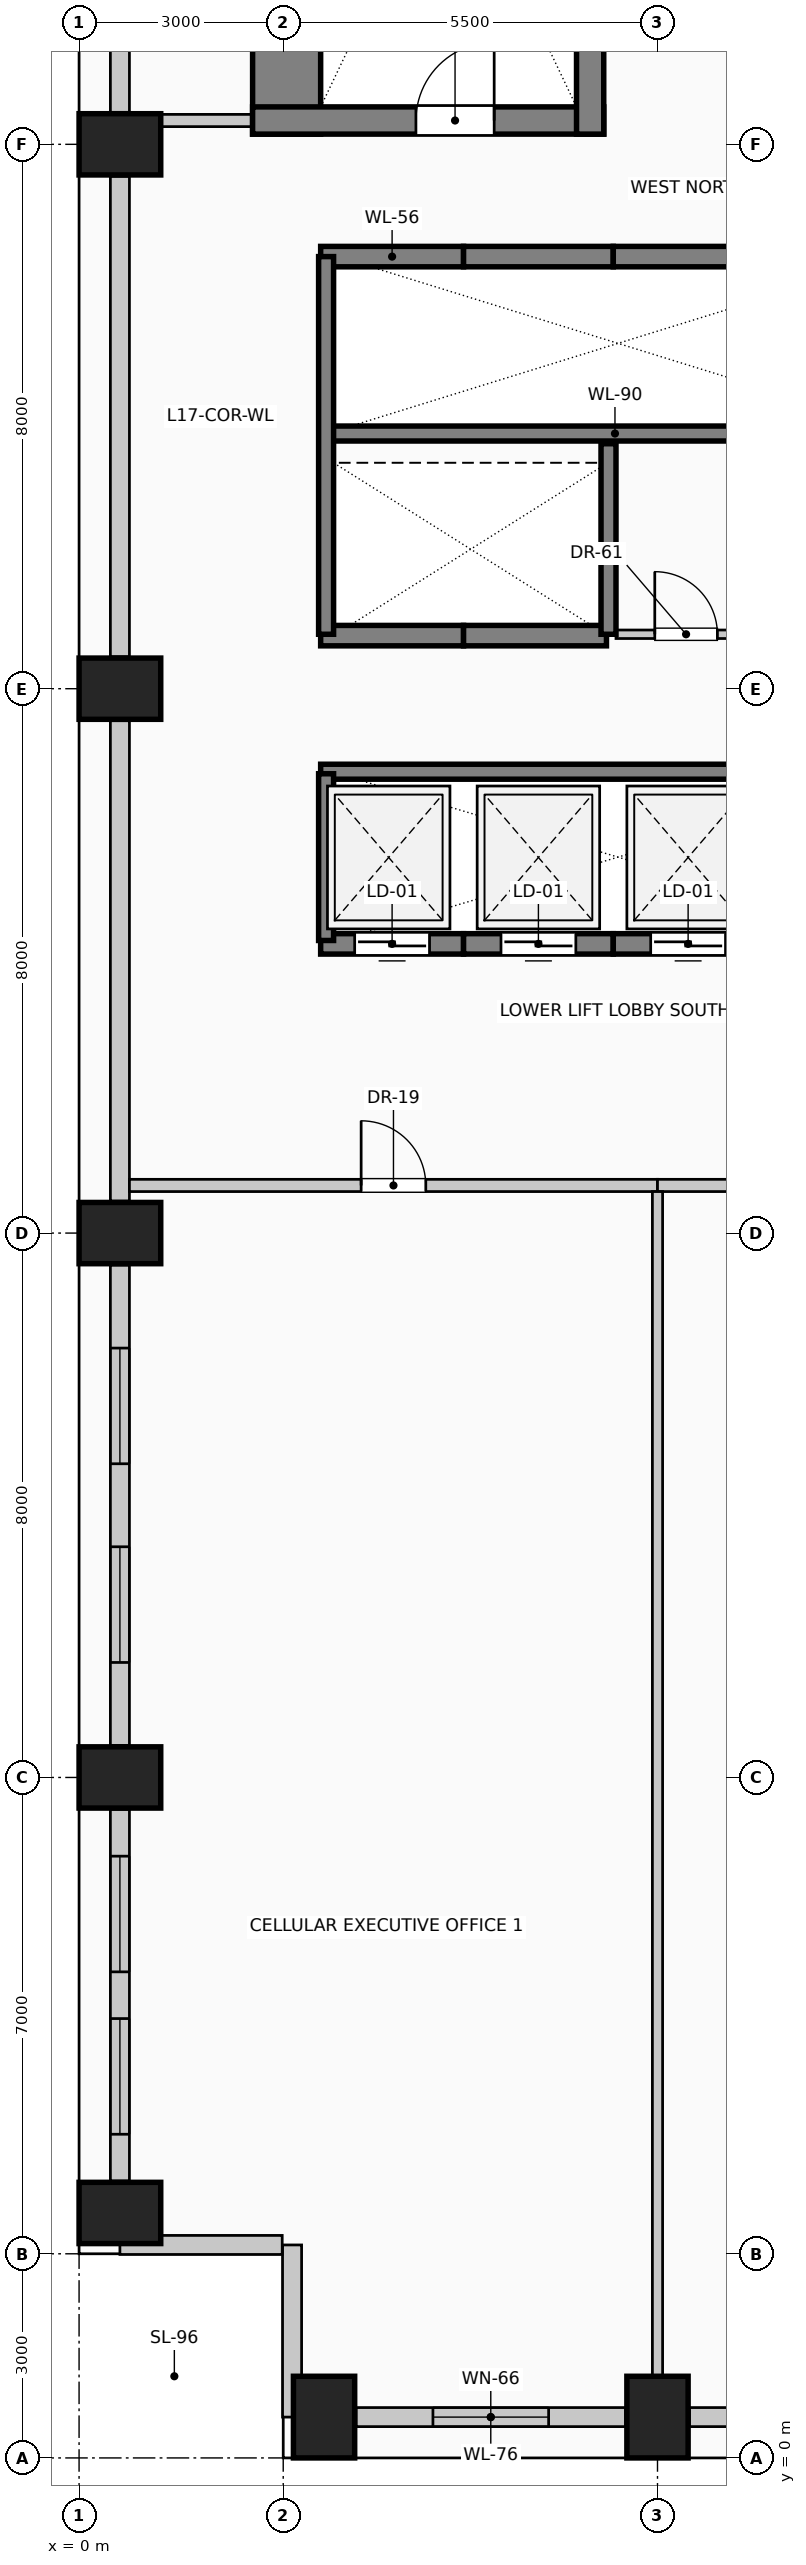
"""IFC4 building model, lengths in metres.
Left out: names, types, materials, properties, quantities, classifications, styles, units other than length and angle.
Written with IfcOpenShell. Run it as: python <this file> out.ifc"""

import sys

from ifc_helpers import new_model, si_unit, direction, frame, frame_2d, origin, origin_2d, place, context, subcontext, project, spatial, rectangle, extrude, element, fill, save


model = new_model("IFC4")
c1 = context("Model", 3, precision=1e-05, world=origin(), true_north=direction((0.0, 1.0)))
c2 = subcontext(c1, "Body", "Model", "MODEL_VIEW")
j1 = project(units=[si_unit("LENGTHUNIT", "METRE"), si_unit("PLANEANGLEUNIT", "RADIAN")], contexts=[c1])
p1 = place(None, origin())
s1 = spatial("IfcSite", under=j1, at=p1, CompositionType="ELEMENT")
p2 = place(p1, origin())
s2 = spatial("IfcBuilding", under=s1, at=p2, CompositionType="ELEMENT")
p3 = place(p2, frame((0.0, 0.0, 70.6)))
s3 = spatial("IfcBuildingStorey", under=s2, at=p3, CompositionType="ELEMENT", Elevation=70.6)
p4 = place(p3, frame((3.05, 34.15, 0.0), z_axis=(0.0, 0.0, 1.0), x_axis=(0.0, 1.0, 0.0)))
e1 = element("IfcWall", 1, at=p4, inside=s3, PredefinedType="SHEAR", context=c2, shape_type="SweptSolid", body=[
    extrude(rectangle(XDim=9.28, YDim=1.0, at=frame_2d((4.64, 0.0))), origin(), (0.0, 0.0, 1.0), 4.0),
])
p5 = place(p3, frame((2.55, 34.35, 0.0), z_axis=(0.0, 0.0, 1.0), x_axis=(1.0, 0.0, 0.0)))
e2 = element("IfcWall", 2, at=p5, inside=s3, PredefinedType="SHEAR", context=c2, shape_type="SweptSolid", body=[
    extrude(rectangle(XDim=5.16, YDim=0.4, at=frame_2d((2.58, 0.0))), origin(), (0.0, 0.0, 1.0), 4.0),
])
p6 = place(p5, frame((2.4, 0.0, 0.0)))
e3 = element("IfcOpeningElement", 3, at=p6, cuts=e2, PredefinedType="OPENING", context=c2, shape_type="SweptSolid", body=[
    extrude(rectangle(XDim=1.15, YDim=2.2, at=frame_2d((0.575, 1.1))), frame((0.0, 0.21, 0.0), z_axis=(0.0, -1.0, 0.0), x_axis=(1.0, 0.0, 0.0)), (0.0, 0.0, 1.0), 0.42),
])
p7 = place(p3, frame((7.51, 34.15, 0.0), z_axis=(0.0, 0.0, 1.0), x_axis=(0.0, 1.0, 0.0)))
e4 = element("IfcWall", 4, at=p7, inside=s3, PredefinedType="SHEAR", context=c2, shape_type="SweptSolid", body=[
    extrude(rectangle(XDim=9.28, YDim=0.4, at=frame_2d((4.64, 0.0))), origin(), (0.0, 0.0, 1.0), 4.0),
])
for number, where, z_axis, x_axis in (
    (5, (3.6, 0.6, 0.0), (0.0, 0.0, 1.0), (1.0, 0.0, 0.0)),
    (6, (8.5, 0.6, 0.0), (0.0, 0.0, 1.0), (1.0, 0.0, 0.0)),
    (7, (0.6, 3.6, 0.0), (0.0, 0.0, 1.0), (0.0, 1.0, 0.0)),
    (8, (0.6, 10.0, 0.0), (0.0, 0.0, 1.0), (0.0, 1.0, 0.0)),
    (9, (0.6, 18.0, 0.0), (0.0, 0.0, 1.0), (0.0, 1.0, 0.0)),
    (10, (0.6, 26.0, 0.0), (0.0, 0.0, 1.0), (0.0, 1.0, 0.0)),
    (11, (0.6, 34.0, 0.0), (0.0, 0.0, 1.0), (0.0, 1.0, 0.0)),
):
    element("IfcColumn", number, at=place(p3, frame(where, z_axis=z_axis, x_axis=x_axis)), inside=s3, PredefinedType="COLUMN", context=c2, shape_type="SweptSolid", body=[
        extrude(rectangle(XDim=0.9, YDim=1.2, at=origin_2d()), origin(), (0.0, 0.0, 1.0), 4.0),
    ])
p8 = place(p3, frame((8.03, 0.6, 0.0), z_axis=(0.0, 0.0, 1.0), x_axis=(-1.0, 0.0, 0.0)))
e12 = element("IfcWall", 12, at=p8, inside=s3, PredefinedType="SOLIDWALL", context=c2, shape_type="SweptSolid", body=[
    extrude(rectangle(XDim=3.96, YDim=0.28, at=frame_2d((1.98, 0.0))), origin(), (0.0, 0.0, 1.0), 2.85),
])
p9 = place(p8, frame((1.13, 0.0, 0.5)))
e13 = element("IfcOpeningElement", 13, at=p9, cuts=e12, PredefinedType="OPENING", context=c2, shape_type="SweptSolid", body=[
    extrude(rectangle(XDim=1.7, YDim=1.95, at=frame_2d((0.85, 0.975))), frame((0.0, 0.15, 0.0), z_axis=(0.0, -1.0, 0.0), x_axis=(1.0, 0.0, 0.0)), (0.0, 0.0, 1.0), 0.3),
])
p10 = place(p3, frame((13.53, 0.6, 0.0), z_axis=(0.0, 0.0, 1.0), x_axis=(-1.0, 0.0, 0.0)))
e14 = element("IfcWall", 14, at=p10, inside=s3, PredefinedType="SOLIDWALL", context=c2, shape_type="SweptSolid", body=[
    extrude(rectangle(XDim=4.56, YDim=0.28, at=frame_2d((2.28, 0.0))), origin(), (0.0, 0.0, 1.0), 2.85),
])
p11 = place(p3, frame((0.6, 4.07, 0.0), z_axis=(0.0, 0.0, 1.0), x_axis=(0.0, 1.0, 0.0)))
e15 = element("IfcWall", 15, at=p11, inside=s3, PredefinedType="SOLIDWALL", context=c2, shape_type="SweptSolid", body=[
    extrude(rectangle(XDim=5.46, YDim=0.28, at=frame_2d((2.73, 0.0))), origin(), (0.0, 0.0, 1.0), 2.85),
])
p12 = place(p11, frame((0.687, 0.0, 0.5)))
e16 = element("IfcOpeningElement", 16, at=p12, cuts=e15, PredefinedType="OPENING", context=c2, shape_type="SweptSolid", body=[
    extrude(rectangle(XDim=1.7, YDim=1.95, at=frame_2d((0.85, 0.975))), frame((0.0, 0.15, 0.0), z_axis=(0.0, -1.0, 0.0), x_axis=(1.0, 0.0, 0.0)), (0.0, 0.0, 1.0), 0.3),
])
p13 = place(p11, frame((3.073, 0.0, 0.5)))
e17 = element("IfcOpeningElement", 17, at=p13, cuts=e15, PredefinedType="OPENING", context=c2, shape_type="SweptSolid", body=[
    extrude(rectangle(XDim=1.7, YDim=1.95, at=frame_2d((0.85, 0.975))), frame((0.0, 0.15, 0.0), z_axis=(0.0, -1.0, 0.0), x_axis=(1.0, 0.0, 0.0)), (0.0, 0.0, 1.0), 0.3),
])
p14 = place(p3, frame((0.6, 10.47, 0.0), z_axis=(0.0, 0.0, 1.0), x_axis=(0.0, 1.0, 0.0)))
e18 = element("IfcWall", 18, at=p14, inside=s3, PredefinedType="SOLIDWALL", context=c2, shape_type="SweptSolid", body=[
    extrude(rectangle(XDim=7.06, YDim=0.28, at=frame_2d((3.53, 0.0))), origin(), (0.0, 0.0, 1.0), 2.85),
])
p15 = place(p14, frame((1.22, 0.0, 0.5)))
e19 = element("IfcOpeningElement", 19, at=p15, cuts=e18, PredefinedType="OPENING", context=c2, shape_type="SweptSolid", body=[
    extrude(rectangle(XDim=1.7, YDim=1.95, at=frame_2d((0.85, 0.975))), frame((0.0, 0.15, 0.0), z_axis=(0.0, -1.0, 0.0), x_axis=(1.0, 0.0, 0.0)), (0.0, 0.0, 1.0), 0.3),
])
p16 = place(p14, frame((4.14, 0.0, 0.5)))
e20 = element("IfcOpeningElement", 20, at=p16, cuts=e18, PredefinedType="OPENING", context=c2, shape_type="SweptSolid", body=[
    extrude(rectangle(XDim=1.7, YDim=1.95, at=frame_2d((0.85, 0.975))), frame((0.0, 0.15, 0.0), z_axis=(0.0, -1.0, 0.0), x_axis=(1.0, 0.0, 0.0)), (0.0, 0.0, 1.0), 0.3),
])
for number, where, z_axis, x_axis in (
    (21, (0.6, 18.47, 0.0), (0.0, 0.0, 1.0), (0.0, 1.0, 0.0)),
    (22, (0.6, 26.47, 0.0), (0.0, 0.0, 1.0), (0.0, 1.0, 0.0)),
):
    element("IfcWall", number, at=place(p3, frame(where, z_axis=z_axis, x_axis=x_axis)), inside=s3, PredefinedType="SOLIDWALL", context=c2, shape_type="SweptSolid", body=[
        extrude(rectangle(XDim=7.06, YDim=0.28, at=frame_2d((3.53, 0.0))), origin(), (0.0, 0.0, 1.0), 2.85),
    ])
p17 = place(p3, frame((0.6, 34.47, 0.0), z_axis=(0.0, 0.0, 1.0), x_axis=(0.0, 1.0, 0.0)))
e23 = element("IfcWall", 23, at=p17, inside=s3, PredefinedType="SOLIDWALL", context=c2, shape_type="SweptSolid", body=[
    extrude(rectangle(XDim=7.46, YDim=0.28, at=frame_2d((3.73, 0.0))), origin(), (0.0, 0.0, 1.0), 2.85),
])
p18 = place(p3, frame((3.13, 0.6, 0.0), z_axis=(0.0, 0.0, 1.0), x_axis=(0.0, 1.0, 0.0)))
e24 = element("IfcWall", 24, at=p18, inside=s3, PredefinedType="SOLIDWALL", context=c2, shape_type="SweptSolid", body=[
    extrude(rectangle(XDim=2.53, YDim=0.28, at=frame_2d((1.265, 0.0))), origin(), (0.0, 0.0, 1.0), 3.7),
])
p19 = place(p3, frame((2.985, 3.13, 0.0), z_axis=(0.0, 0.0, 1.0), x_axis=(-1.0, 0.0, 0.0)))
e25 = element("IfcWall", 25, at=p19, inside=s3, PredefinedType="SOLIDWALL", context=c2, shape_type="SweptSolid", body=[
    extrude(rectangle(XDim=2.385, YDim=0.28, at=frame_2d((1.192, 0.0))), origin(), (0.0, 0.0, 1.0), 3.7),
])
p20 = place(p3, frame((5.65, 22.25, 0.0), z_axis=(0.0, 0.0, 1.0), x_axis=(-1.0, 0.0, 0.0)))
e26 = element("IfcWall", 26, at=p20, inside=s3, PredefinedType="SOLIDWALL", context=c2, shape_type="SweptSolid", body=[
    extrude(rectangle(XDim=2.1, YDim=0.3, at=frame_2d((1.05, 0.0))), origin(), (0.0, 0.0, 1.0), 4.0),
])
p21 = place(p20, frame((0.5, 0.0, 0.0)))
e27 = element("IfcOpeningElement", 27, at=p21, cuts=e26, PredefinedType="OPENING", context=c2, shape_type="SweptSolid", body=[
    extrude(rectangle(XDim=1.1, YDim=2.2, at=frame_2d((0.55, 1.1))), frame((0.0, 0.16, 0.0), z_axis=(0.0, -1.0, 0.0), x_axis=(1.0, 0.0, 0.0)), (0.0, 0.0, 1.0), 0.32),
])
p22 = place(p3, frame((7.85, 22.25, 0.0), z_axis=(0.0, 0.0, 1.0), x_axis=(-1.0, 0.0, 0.0)))
e28 = element("IfcWall", 28, at=p22, inside=s3, PredefinedType="SOLIDWALL", context=c2, shape_type="SweptSolid", body=[
    extrude(rectangle(XDim=2.2, YDim=0.3, at=frame_2d((1.1, 0.0))), origin(), (0.0, 0.0, 1.0), 4.0),
])
p23 = place(p22, frame((0.55, 0.0, 0.0)))
e29 = element("IfcOpeningElement", 29, at=p23, cuts=e28, PredefinedType="OPENING", context=c2, shape_type="SweptSolid", body=[
    extrude(rectangle(XDim=1.1, YDim=2.2, at=frame_2d((0.55, 1.1))), frame((0.0, 0.16, 0.0), z_axis=(0.0, -1.0, 0.0), x_axis=(1.0, 0.0, 0.0)), (0.0, 0.0, 1.0), 0.32),
])
p24 = place(p3, frame((10.05, 22.25, 0.0), z_axis=(0.0, 0.0, 1.0), x_axis=(-1.0, 0.0, 0.0)))
e30 = element("IfcWall", 30, at=p24, inside=s3, PredefinedType="SOLIDWALL", context=c2, shape_type="SweptSolid", body=[
    extrude(rectangle(XDim=2.2, YDim=0.3, at=frame_2d((1.1, 0.0))), origin(), (0.0, 0.0, 1.0), 4.0),
])
p25 = place(p24, frame((0.55, 0.0, 0.0)))
e31 = element("IfcOpeningElement", 31, at=p25, cuts=e30, PredefinedType="OPENING", context=c2, shape_type="SweptSolid", body=[
    extrude(rectangle(XDim=1.1, YDim=2.2, at=frame_2d((0.55, 1.1))), frame((0.0, 0.16, 0.0), z_axis=(0.0, -1.0, 0.0), x_axis=(1.0, 0.0, 0.0)), (0.0, 0.0, 1.0), 0.32),
])
p26 = place(p3, frame((3.55, 32.35, 0.0), z_axis=(0.0, 0.0, 1.0), x_axis=(1.0, 0.0, 0.0)))
e32 = element("IfcWall", 32, at=p26, inside=s3, PredefinedType="SOLIDWALL", context=c2, shape_type="SweptSolid", body=[
    extrude(rectangle(XDim=2.1, YDim=0.3, at=frame_2d((1.05, 0.0))), origin(), (0.0, 0.0, 1.0), 4.0),
])
p27 = place(p3, frame((5.65, 32.35, 0.0), z_axis=(0.0, 0.0, 1.0), x_axis=(1.0, 0.0, 0.0)))
e33 = element("IfcWall", 33, at=p27, inside=s3, PredefinedType="SOLIDWALL", context=c2, shape_type="SweptSolid", body=[
    extrude(rectangle(XDim=2.2, YDim=0.3, at=frame_2d((1.1, 0.0))), origin(), (0.0, 0.0, 1.0), 4.0),
])
p28 = place(p3, frame((7.85, 32.35, 0.0), z_axis=(0.0, 0.0, 1.0), x_axis=(1.0, 0.0, 0.0)))
e34 = element("IfcWall", 34, at=p28, inside=s3, PredefinedType="SOLIDWALL", context=c2, shape_type="SweptSolid", body=[
    extrude(rectangle(XDim=2.2, YDim=0.3, at=frame_2d((1.1, 0.0))), origin(), (0.0, 0.0, 1.0), 4.0),
])
p29 = place(p3, frame((5.65, 26.78, 0.0), z_axis=(0.0, 0.0, 1.0), x_axis=(-1.0, 0.0, 0.0)))
e35 = element("IfcWall", 35, at=p29, inside=s3, PredefinedType="SOLIDWALL", context=c2, shape_type="SweptSolid", body=[
    extrude(rectangle(XDim=2.1, YDim=0.3, at=frame_2d((1.05, 0.0))), origin(), (0.0, 0.0, 1.0), 4.0),
])
p30 = place(p3, frame((7.75, 26.78, 0.0), z_axis=(0.0, 0.0, 1.0), x_axis=(-1.0, 0.0, 0.0)))
e36 = element("IfcWall", 36, at=p30, inside=s3, PredefinedType="SOLIDWALL", context=c2, shape_type="SweptSolid", body=[
    extrude(rectangle(XDim=2.1, YDim=0.3, at=frame_2d((1.05, 0.0))), origin(), (0.0, 0.0, 1.0), 4.0),
])
p31 = place(p3, frame((3.55, 29.75, 0.0), z_axis=(0.0, 0.0, 1.0), x_axis=(1.0, 0.0, 0.0)))
e37 = element("IfcWall", 37, at=p31, inside=s3, PredefinedType="SOLIDWALL", context=c2, shape_type="SweptSolid", body=[
    extrude(rectangle(XDim=8.65, YDim=0.22, at=frame_2d((4.325, 0.0))), origin(), (0.0, 0.0, 1.0), 4.0),
])
p32 = place(p3, frame((3.63, 26.8, 0.0), z_axis=(0.0, 0.0, 1.0), x_axis=(0.0, 1.0, 0.0)))
e38 = element("IfcWall", 38, at=p32, inside=s3, PredefinedType="SOLIDWALL", context=c2, shape_type="SweptSolid", body=[
    extrude(rectangle(XDim=5.55, YDim=0.22, at=frame_2d((2.775, 0.0))), origin(), (0.0, 0.0, 1.0), 4.0),
])
p33 = place(p3, frame((7.78, 26.8, 0.0), z_axis=(0.0, 0.0, 1.0), x_axis=(0.0, 1.0, 0.0)))
e39 = element("IfcWall", 39, at=p33, inside=s3, PredefinedType="SOLIDWALL", context=c2, shape_type="SweptSolid", body=[
    extrude(rectangle(XDim=2.8, YDim=0.22, at=frame_2d((1.4, 0.0))), origin(), (0.0, 0.0, 1.0), 4.0),
])
p34 = place(p3, frame((3.55, 24.78, 0.0), z_axis=(0.0, 0.0, 1.0), x_axis=(1.0, 0.0, 0.0)))
e40 = element("IfcWall", 40, at=p34, inside=s3, PredefinedType="SOLIDWALL", context=c2, shape_type="SweptSolid", body=[
    extrude(rectangle(XDim=8.65, YDim=0.22, at=frame_2d((4.325, 0.0))), origin(), (0.0, 0.0, 1.0), 4.0),
])
p35 = place(p3, frame((3.63, 22.3, 0.0), z_axis=(0.0, 0.0, 1.0), x_axis=(0.0, 1.0, 0.0)))
e41 = element("IfcWall", 41, at=p35, inside=s3, PredefinedType="SOLIDWALL", context=c2, shape_type="SweptSolid", body=[
    extrude(rectangle(XDim=2.45, YDim=0.22, at=frame_2d((1.225, 0.0))), origin(), (0.0, 0.0, 1.0), 4.0),
])
p36 = place(p3, frame((0.74, 18.7, 0.0), z_axis=(0.0, 0.0, 1.0), x_axis=(1.0, 0.0, 0.0)))
e42 = element("IfcWall", 42, at=p36, inside=s3, PredefinedType="PARTITIONING", context=c2, shape_type="SweptSolid", body=[
    extrude(rectangle(XDim=7.76, YDim=0.18, at=frame_2d((3.88, 0.0))), origin(), (0.0, 0.0, 1.0), 3.7),
])
p37 = place(p36, frame((3.405, 0.0, 0.0)))
e43 = element("IfcOpeningElement", 43, at=p37, cuts=e42, PredefinedType="OPENING", context=c2, shape_type="SweptSolid", body=[
    extrude(rectangle(XDim=0.95, YDim=2.15, at=frame_2d((0.475, 1.075))), frame((0.0, 0.1, 0.0), z_axis=(0.0, -1.0, 0.0), x_axis=(1.0, 0.0, 0.0)), (0.0, 0.0, 1.0), 0.2),
])
p38 = place(p3, frame((8.5, 18.7, 0.0), z_axis=(0.0, 0.0, 1.0), x_axis=(1.0, 0.0, 0.0)))
e44 = element("IfcWall", 44, at=p38, inside=s3, PredefinedType="PARTITIONING", context=c2, shape_type="SweptSolid", body=[
    extrude(rectangle(XDim=13.9, YDim=0.18, at=frame_2d((6.95, 0.0))), origin(), (0.0, 0.0, 1.0), 3.7),
])
p39 = place(p38, frame((4.985, 0.0, 0.0)))
e45 = element("IfcOpeningElement", 45, at=p39, cuts=e44, PredefinedType="OPENING", context=c2, shape_type="SweptSolid", body=[
    extrude(rectangle(XDim=1.05, YDim=2.15, at=frame_2d((0.525, 1.075))), frame((0.0, 0.1, 0.0), z_axis=(0.0, -1.0, 0.0), x_axis=(1.0, 0.0, 0.0)), (0.0, 0.0, 1.0), 0.2),
])
p40 = place(p3, frame((7.89, 26.8, 0.0), z_axis=(0.0, 0.0, 1.0), x_axis=(1.0, 0.0, 0.0)))
e46 = element("IfcWall", 46, at=p40, inside=s3, PredefinedType="PARTITIONING", context=c2, shape_type="SweptSolid", body=[
    extrude(rectangle(XDim=2.06, YDim=0.125, at=frame_2d((1.03, 0.0))), origin(), (0.0, 0.0, 1.0), 3.7),
])
p41 = place(p40, frame((0.57, 0.0, 0.0)))
e47 = element("IfcOpeningElement", 47, at=p41, cuts=e46, PredefinedType="OPENING", context=c2, shape_type="SweptSolid", body=[
    extrude(rectangle(XDim=0.92, YDim=2.1, at=frame_2d((0.46, 1.05))), frame((0.0, 0.073, 0.0), z_axis=(0.0, -1.0, 0.0), x_axis=(1.0, 0.0, 0.0)), (0.0, 0.0, 1.0), 0.145),
])
p42 = place(p3, frame((1.2, 34.35, 0.0), z_axis=(0.0, 0.0, 1.0), x_axis=(1.0, 0.0, 0.0)))
e48 = element("IfcWall", 48, at=p42, inside=s3, PredefinedType="PARTITIONING", context=c2, shape_type="SweptSolid", body=[
    extrude(rectangle(XDim=1.35, YDim=0.18, at=frame_2d((0.675, 0.0))), origin(), (0.0, 0.0, 1.0), 3.7),
])
p43 = place(p3, frame((8.5, 1.2, 0.0), z_axis=(0.0, 0.0, 1.0), x_axis=(0.0, 1.0, 0.0)))
e49 = element("IfcWall", 49, at=p43, inside=s3, PredefinedType="PARTITIONING", context=c2, shape_type="SweptSolid", body=[
    extrude(rectangle(XDim=17.41, YDim=0.15, at=frame_2d((8.705, 0.0))), origin(), (0.0, 0.0, 1.0), 3.7),
])
p44 = place(p9, origin())
e50 = element("IfcWindow", 50, at=p44, inside=s3, PartitioningType="SINGLE_PANEL", PredefinedType="WINDOW", context=c2, shape_type="SweptSolid", body=[
    extrude(rectangle(XDim=1.7, YDim=1.95, at=frame_2d((0.85, 0.975))), frame((0.0, 0.03, 0.0), z_axis=(0.0, -1.0, 0.0), x_axis=(1.0, 0.0, 0.0)), (0.0, 0.0, 1.0), 0.06),
])
fill(e13, e50)
p45 = place(p12, origin())
e51 = element("IfcWindow", 51, at=p45, inside=s3, PartitioningType="SINGLE_PANEL", PredefinedType="WINDOW", context=c2, shape_type="SweptSolid", body=[
    extrude(rectangle(XDim=1.7, YDim=1.95, at=frame_2d((0.85, 0.975))), frame((0.0, 0.03, 0.0), z_axis=(0.0, -1.0, 0.0), x_axis=(1.0, 0.0, 0.0)), (0.0, 0.0, 1.0), 0.06),
])
fill(e16, e51)
p46 = place(p13, origin())
e52 = element("IfcWindow", 52, at=p46, inside=s3, PartitioningType="SINGLE_PANEL", PredefinedType="WINDOW", context=c2, shape_type="SweptSolid", body=[
    extrude(rectangle(XDim=1.7, YDim=1.95, at=frame_2d((0.85, 0.975))), frame((0.0, 0.03, 0.0), z_axis=(0.0, -1.0, 0.0), x_axis=(1.0, 0.0, 0.0)), (0.0, 0.0, 1.0), 0.06),
])
fill(e17, e52)
p47 = place(p15, origin())
e53 = element("IfcWindow", 53, at=p47, inside=s3, PartitioningType="SINGLE_PANEL", PredefinedType="WINDOW", context=c2, shape_type="SweptSolid", body=[
    extrude(rectangle(XDim=1.7, YDim=1.95, at=frame_2d((0.85, 0.975))), frame((0.0, 0.03, 0.0), z_axis=(0.0, -1.0, 0.0), x_axis=(1.0, 0.0, 0.0)), (0.0, 0.0, 1.0), 0.06),
])
fill(e19, e53)
p48 = place(p16, origin())
e54 = element("IfcWindow", 54, at=p48, inside=s3, PartitioningType="SINGLE_PANEL", PredefinedType="WINDOW", context=c2, shape_type="SweptSolid", body=[
    extrude(rectangle(XDim=1.7, YDim=1.95, at=frame_2d((0.85, 0.975))), frame((0.0, 0.03, 0.0), z_axis=(0.0, -1.0, 0.0), x_axis=(1.0, 0.0, 0.0)), (0.0, 0.0, 1.0), 0.06),
])
fill(e20, e54)
p49 = place(p21, origin())
e55 = element("IfcDoor", 55, at=p49, inside=s3, OperationType="SLIDING_TO_LEFT", PredefinedType="DOOR", context=c2, shape_type="SweptSolid", body=[
    extrude(rectangle(XDim=1.1, YDim=2.2, at=frame_2d((0.55, 1.1))), frame((0.0, 0.025, 0.0), z_axis=(0.0, -1.0, 0.0), x_axis=(1.0, 0.0, 0.0)), (0.0, 0.0, 1.0), 0.05),
])
fill(e27, e55)
p50 = place(p23, origin())
e56 = element("IfcDoor", 56, at=p50, inside=s3, OperationType="SLIDING_TO_RIGHT", PredefinedType="DOOR", context=c2, shape_type="SweptSolid", body=[
    extrude(rectangle(XDim=1.1, YDim=2.2, at=frame_2d((0.55, 1.1))), frame((0.0, 0.025, 0.0), z_axis=(0.0, -1.0, 0.0), x_axis=(1.0, 0.0, 0.0)), (0.0, 0.0, 1.0), 0.05),
])
fill(e29, e56)
p51 = place(p25, origin())
e57 = element("IfcDoor", 57, at=p51, inside=s3, OperationType="SLIDING_TO_LEFT", PredefinedType="DOOR", context=c2, shape_type="SweptSolid", body=[
    extrude(rectangle(XDim=1.1, YDim=2.2, at=frame_2d((0.55, 1.1))), frame((0.0, 0.025, 0.0), z_axis=(0.0, -1.0, 0.0), x_axis=(1.0, 0.0, 0.0)), (0.0, 0.0, 1.0), 0.05),
])
fill(e31, e57)
p52 = place(p6, origin())
e58 = element("IfcDoor", 58, at=p52, inside=s3, OperationType="SINGLE_SWING_RIGHT", PredefinedType="DOOR", context=c2, shape_type="SweptSolid", body=[
    extrude(rectangle(XDim=1.15, YDim=2.2, at=frame_2d((0.575, 1.1))), frame((0.0, 0.025, 0.0), z_axis=(0.0, -1.0, 0.0), x_axis=(1.0, 0.0, 0.0)), (0.0, 0.0, 1.0), 0.05),
])
fill(e3, e58)
p53 = place(p37, origin())
e59 = element("IfcDoor", 59, at=p53, inside=s3, OperationType="SINGLE_SWING_LEFT", PredefinedType="DOOR", context=c2, shape_type="SweptSolid", body=[
    extrude(rectangle(XDim=0.95, YDim=2.15, at=frame_2d((0.475, 1.075))), frame((0.0, 0.025, 0.0), z_axis=(0.0, -1.0, 0.0), x_axis=(1.0, 0.0, 0.0)), (0.0, 0.0, 1.0), 0.05),
])
fill(e43, e59)
p54 = place(p41, origin())
e60 = element("IfcDoor", 60, at=p54, inside=s3, OperationType="SINGLE_SWING_LEFT", PredefinedType="DOOR", context=c2, shape_type="SweptSolid", body=[
    extrude(rectangle(XDim=0.92, YDim=2.1, at=frame_2d((0.46, 1.05))), frame((0.0, 0.025, 0.0), z_axis=(0.0, -1.0, 0.0), x_axis=(1.0, 0.0, 0.0)), (0.0, 0.0, 1.0), 0.05),
])
fill(e47, e60)
save(model, sys.argv[1])
